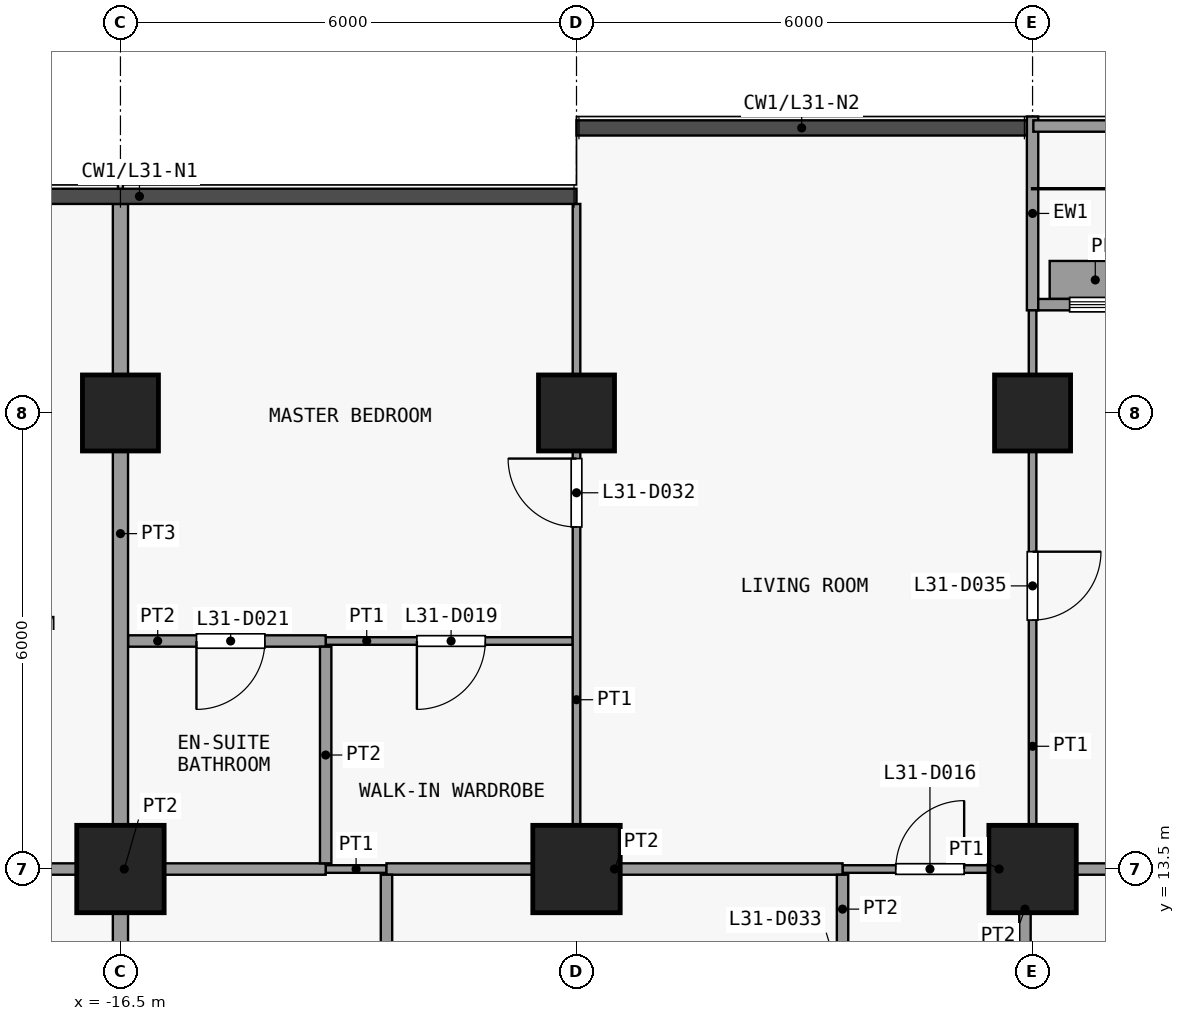
"""IFC4 building model, lengths in metres.
Left out: names, types, materials, properties, quantities, classifications, styles, units other than length and angle.
Written with IfcOpenShell. Run it as: python <this file> out.ifc"""

import sys

from ifc_helpers import new_model, si_unit, direction, frame, frame_2d, origin, origin_2d, place, context, subcontext, project, spatial, rectangle, extrude, element, fill, save


model = new_model("IFC4")
c1 = context("Model", 3, precision=1e-05, world=origin(), true_north=direction((0.0, 1.0)))
c2 = subcontext(c1, "Body", "Model", "MODEL_VIEW")
j1 = project(units=[si_unit("LENGTHUNIT", "METRE"), si_unit("PLANEANGLEUNIT", "RADIAN")], contexts=[c1])
p1 = place(None, origin())
s1 = spatial("IfcSite", under=j1, at=p1, CompositionType="ELEMENT")
p2 = place(p1, origin())
s2 = spatial("IfcBuilding", under=s1, at=p2, CompositionType="ELEMENT")
p3 = place(p2, frame((0.0, 0.0, 124.3)))
s3 = spatial("IfcBuildingStorey", under=s2, at=p3, CompositionType="ELEMENT", Elevation=124.3)
p4 = place(p3, frame((-16.5, 13.5, 0.0), z_axis=(0.0, 0.0, 1.0), x_axis=(1.0, 0.0, 0.0)))
e1 = element("IfcColumn", 1, at=p4, inside=s3, PredefinedType="COLUMN", context=c2, shape_type="SweptSolid", body=[
    extrude(rectangle(XDim=1.15, YDim=1.15, at=origin_2d()), origin(), (0.0, 0.0, 1.0), 3.6),
])
p5 = place(p3, frame((-16.5, 19.5, 0.0), z_axis=(0.0, 0.0, 1.0), x_axis=(1.0, 0.0, 0.0)))
e2 = element("IfcColumn", 2, at=p5, inside=s3, PredefinedType="COLUMN", context=c2, shape_type="SweptSolid", body=[
    extrude(rectangle(XDim=1.0, YDim=1.0, at=origin_2d()), origin(), (0.0, 0.0, 1.0), 3.6),
])
p6 = place(p3, frame((-10.5, 13.5, 0.0), z_axis=(0.0, 0.0, 1.0), x_axis=(1.0, 0.0, 0.0)))
e3 = element("IfcColumn", 3, at=p6, inside=s3, PredefinedType="COLUMN", context=c2, shape_type="SweptSolid", body=[
    extrude(rectangle(XDim=1.15, YDim=1.15, at=origin_2d()), origin(), (0.0, 0.0, 1.0), 3.6),
])
p7 = place(p3, frame((-10.5, 19.5, 0.0), z_axis=(0.0, 0.0, 1.0), x_axis=(1.0, 0.0, 0.0)))
e4 = element("IfcColumn", 4, at=p7, inside=s3, PredefinedType="COLUMN", context=c2, shape_type="SweptSolid", body=[
    extrude(rectangle(XDim=1.0, YDim=1.0, at=origin_2d()), origin(), (0.0, 0.0, 1.0), 3.6),
])
p8 = place(p3, frame((-4.5, 13.5, 0.0), z_axis=(0.0, 0.0, 1.0), x_axis=(1.0, 0.0, 0.0)))
e5 = element("IfcColumn", 5, at=p8, inside=s3, PredefinedType="COLUMN", context=c2, shape_type="SweptSolid", body=[
    extrude(rectangle(XDim=1.15, YDim=1.15, at=origin_2d()), origin(), (0.0, 0.0, 1.0), 3.6),
])
p9 = place(p3, frame((-4.5, 19.5, 0.0), z_axis=(0.0, 0.0, 1.0), x_axis=(1.0, 0.0, 0.0)))
e6 = element("IfcColumn", 6, at=p9, inside=s3, PredefinedType="COLUMN", context=c2, shape_type="SweptSolid", body=[
    extrude(rectangle(XDim=1.0, YDim=1.0, at=origin_2d()), origin(), (0.0, 0.0, 1.0), 3.6),
])
p10 = place(p3, frame((-4.5, 20.85, 0.0), z_axis=(0.0, 0.0, 1.0), x_axis=(0.0, 1.0, 0.0)))
e7 = element("IfcWall", 7, at=p10, inside=s3, PredefinedType="SOLIDWALL", context=c2, shape_type="SweptSolid", body=[
    extrude(rectangle(XDim=2.55, YDim=0.15, at=frame_2d((1.275, 0.0))), origin(), (0.0, 0.0, 1.0), 3.3),
])
p11 = place(p3, frame((-4.425, 20.925, 0.0), z_axis=(0.0, 0.0, 1.0), x_axis=(1.0, 0.0, 0.0)))
e8 = element("IfcWall", 8, at=p11, inside=s3, PredefinedType="SOLIDWALL", context=c2, shape_type="SweptSolid", body=[
    extrude(rectangle(XDim=8.925, YDim=0.15, at=frame_2d((4.462, 0.0))), origin(), (0.0, 0.0, 1.0), 3.3),
])
p12 = place(p11, frame((3.825, 0.0, 0.0)))
e9 = element("IfcOpeningElement", 9, at=p12, cuts=e8, PredefinedType="OPENING", context=c2, shape_type="SweptSolid", body=[
    extrude(rectangle(XDim=1.2, YDim=2.4, at=frame_2d((0.6, 1.2))), frame((0.0, 0.085, 0.0), z_axis=(0.0, -1.0, 0.0), x_axis=(1.0, 0.0, 0.0)), (0.0, 0.0, 1.0), 0.17),
])
p13 = place(p11, frame((0.413, 0.0, 0.9)))
e10 = element("IfcOpeningElement", 10, at=p13, cuts=e8, PredefinedType="OPENING", context=c2, shape_type="SweptSolid", body=[
    extrude(rectangle(XDim=3.0, YDim=2.1, at=frame_2d((1.5, 1.05))), frame((0.0, 0.085, 0.0), z_axis=(0.0, -1.0, 0.0), x_axis=(1.0, 0.0, 0.0)), (0.0, 0.0, 1.0), 0.17),
])
p14 = place(p11, frame((5.475, 0.0, 0.9)))
e11 = element("IfcOpeningElement", 11, at=p14, cuts=e8, PredefinedType="OPENING", context=c2, shape_type="SweptSolid", body=[
    extrude(rectangle(XDim=3.0, YDim=2.1, at=frame_2d((1.5, 1.05))), frame((0.0, 0.085, 0.0), z_axis=(0.0, -1.0, 0.0), x_axis=(1.0, 0.0, 0.0)), (0.0, 0.0, 1.0), 0.17),
])
p15 = place(p3, frame((-4.275, 21.25, 0.0), z_axis=(0.0, 0.0, 1.0), x_axis=(1.0, 0.0, 0.0)))
e12 = element("IfcWall", 12, at=p15, inside=s3, PredefinedType="USERDEFINED", context=c2, shape_type="SweptSolid", body=[
    extrude(rectangle(XDim=1.2, YDim=0.5, at=frame_2d((0.6, 0.0))), origin(), (0.0, 0.0, 1.0), 0.9),
])
p16 = place(p3, frame((-4.49, 23.275, 0.0), z_axis=(0.0, 0.0, 1.0), x_axis=(1.0, 0.0, 0.0)))
e13 = element("IfcWall", 13, at=p16, inside=s3, PredefinedType="PARAPET", context=c2, shape_type="SweptSolid", body=[
    extrude(rectangle(XDim=8.94, YDim=0.15, at=frame_2d((4.47, 0.0))), origin(), (0.0, 0.0, 1.0), 1.15),
])
p17 = place(p3, frame((-13.8, 13.5, 0.0), z_axis=(0.0, 0.0, 1.0), x_axis=(1.0, 0.0, 0.0)))
e14 = element("IfcWall", 14, at=p17, inside=s3, PredefinedType="PARTITIONING", context=c2, shape_type="SweptSolid", body=[
    extrude(rectangle(XDim=0.8, YDim=0.1, at=frame_2d((0.4, 0.0))), origin(), (0.0, 0.0, 1.0), 3.3),
])
p18 = place(p3, frame((-7.0, 13.5, 0.0), z_axis=(0.0, 0.0, 1.0), x_axis=(1.0, 0.0, 0.0)))
e15 = element("IfcWall", 15, at=p18, inside=s3, PredefinedType="PARTITIONING", context=c2, shape_type="SweptSolid", body=[
    extrude(rectangle(XDim=2.4, YDim=0.1, at=frame_2d((1.2, 0.0))), origin(), (0.0, 0.0, 1.0), 3.3),
])
p19 = place(p18, frame((0.7, 0.0, 0.0)))
e16 = element("IfcOpeningElement", 16, at=p19, cuts=e15, PredefinedType="OPENING", context=c2, shape_type="SweptSolid", body=[
    extrude(rectangle(XDim=0.9, YDim=2.1, at=frame_2d((0.45, 1.05))), frame((0.0, 0.06, 0.0), z_axis=(0.0, -1.0, 0.0), x_axis=(1.0, 0.0, 0.0)), (0.0, 0.0, 1.0), 0.12),
])
p20 = place(p3, frame((-19.1, 13.5, 0.0), z_axis=(0.0, 0.0, 1.0), x_axis=(1.0, 0.0, 0.0)))
e17 = element("IfcWall", 17, at=p20, inside=s3, PredefinedType="PARTITIONING", context=c2, shape_type="SweptSolid", body=[
    extrude(rectangle(XDim=5.3, YDim=0.15, at=frame_2d((2.65, 0.0))), origin(), (0.0, 0.0, 1.0), 3.3),
])
p21 = place(p3, frame((-13.0, 13.5, 0.0), z_axis=(0.0, 0.0, 1.0), x_axis=(1.0, 0.0, 0.0)))
e18 = element("IfcWall", 18, at=p21, inside=s3, PredefinedType="PARTITIONING", context=c2, shape_type="SweptSolid", body=[
    extrude(rectangle(XDim=6.0, YDim=0.15, at=frame_2d((3.0, 0.0))), origin(), (0.0, 0.0, 1.0), 3.3),
])
p22 = place(p3, frame((-4.5, 13.5, 0.0), z_axis=(0.0, 0.0, 1.0), x_axis=(1.0, 0.0, 0.0)))
e19 = element("IfcWall", 19, at=p22, inside=s3, PredefinedType="PARTITIONING", context=c2, shape_type="SweptSolid", body=[
    extrude(rectangle(XDim=7.4, YDim=0.15, at=frame_2d((3.7, 0.0))), origin(), (0.0, 0.0, 1.0), 3.3),
])
p23 = place(p3, frame((-13.8, 16.5, 0.0), z_axis=(0.0, 0.0, 1.0), x_axis=(1.0, 0.0, 0.0)))
e20 = element("IfcWall", 20, at=p23, inside=s3, PredefinedType="PARTITIONING", context=c2, shape_type="SweptSolid", body=[
    extrude(rectangle(XDim=3.25, YDim=0.1, at=frame_2d((1.625, 0.0))), origin(), (0.0, 0.0, 1.0), 3.3),
])
p24 = place(p23, frame((1.2, 0.0, 0.0)))
e21 = element("IfcOpeningElement", 21, at=p24, cuts=e20, PredefinedType="OPENING", context=c2, shape_type="SweptSolid", body=[
    extrude(rectangle(XDim=0.9, YDim=2.1, at=frame_2d((0.45, 1.05))), frame((0.0, 0.06, 0.0), z_axis=(0.0, -1.0, 0.0), x_axis=(1.0, 0.0, 0.0)), (0.0, 0.0, 1.0), 0.12),
])
p25 = place(p3, frame((-16.4, 16.5, 0.0), z_axis=(0.0, 0.0, 1.0), x_axis=(1.0, 0.0, 0.0)))
e22 = element("IfcWall", 22, at=p25, inside=s3, PredefinedType="PARTITIONING", context=c2, shape_type="SweptSolid", body=[
    extrude(rectangle(XDim=2.6, YDim=0.15, at=frame_2d((1.3, 0.0))), origin(), (0.0, 0.0, 1.0), 3.3),
])
p26 = place(p25, frame((0.9, 0.0, 0.0)))
e23 = element("IfcOpeningElement", 23, at=p26, cuts=e22, PredefinedType="OPENING", context=c2, shape_type="SweptSolid", body=[
    extrude(rectangle(XDim=0.9, YDim=2.1, at=frame_2d((0.45, 1.05))), frame((0.0, 0.085, 0.0), z_axis=(0.0, -1.0, 0.0), x_axis=(1.0, 0.0, 0.0)), (0.0, 0.0, 1.0), 0.17),
])
p27 = place(p3, frame((-16.5, 10.6, 0.0), z_axis=(0.0, 0.0, 1.0), x_axis=(0.0, 1.0, 0.0)))
e24 = element("IfcWall", 24, at=p27, inside=s3, PredefinedType="PARTITIONING", context=c2, shape_type="SweptSolid", body=[
    extrude(rectangle(XDim=2.825, YDim=0.2, at=frame_2d((1.413, 0.0))), origin(), (0.0, 0.0, 1.0), 3.3),
])
p28 = place(p3, frame((-16.5, 13.575, 0.0), z_axis=(0.0, 0.0, 1.0), x_axis=(0.0, 1.0, 0.0)))
e25 = element("IfcWall", 25, at=p28, inside=s3, PredefinedType="PARTITIONING", context=c2, shape_type="SweptSolid", body=[
    extrude(rectangle(XDim=8.675, YDim=0.2, at=frame_2d((4.337, 0.0))), origin(), (0.0, 0.0, 1.0), 3.3),
])
p29 = place(p3, frame((-13.8, 13.575, 0.0), z_axis=(0.0, 0.0, 1.0), x_axis=(0.0, 1.0, 0.0)))
e26 = element("IfcWall", 26, at=p29, inside=s3, PredefinedType="PARTITIONING", context=c2, shape_type="SweptSolid", body=[
    extrude(rectangle(XDim=2.85, YDim=0.15, at=frame_2d((1.425, 0.0))), origin(), (0.0, 0.0, 1.0), 3.3),
])
p30 = place(p3, frame((-13.0, 10.6, 0.0), z_axis=(0.0, 0.0, 1.0), x_axis=(0.0, 1.0, 0.0)))
e27 = element("IfcWall", 27, at=p30, inside=s3, PredefinedType="PARTITIONING", context=c2, shape_type="SweptSolid", body=[
    extrude(rectangle(XDim=2.825, YDim=0.15, at=frame_2d((1.413, 0.0))), origin(), (0.0, 0.0, 1.0), 3.3),
])
p31 = place(p30, frame((1.0, 0.0, 0.0)))
e28 = element("IfcOpeningElement", 28, at=p31, cuts=e27, PredefinedType="OPENING", context=c2, shape_type="SweptSolid", body=[
    extrude(rectangle(XDim=0.9, YDim=2.1, at=frame_2d((0.45, 1.05))), frame((0.0, 0.085, 0.0), z_axis=(0.0, -1.0, 0.0), x_axis=(1.0, 0.0, 0.0)), (0.0, 0.0, 1.0), 0.17),
])
p32 = place(p3, frame((-10.5, 13.575, 0.0), z_axis=(0.0, 0.0, 1.0), x_axis=(0.0, 1.0, 0.0)))
e29 = element("IfcWall", 29, at=p32, inside=s3, PredefinedType="PARTITIONING", context=c2, shape_type="SweptSolid", body=[
    extrude(rectangle(XDim=8.675, YDim=0.1, at=frame_2d((4.337, 0.0))), origin(), (0.0, 0.0, 1.0), 3.3),
])
p33 = place(p32, frame((4.425, 0.0, 0.0)))
e30 = element("IfcOpeningElement", 30, at=p33, cuts=e29, PredefinedType="OPENING", context=c2, shape_type="SweptSolid", body=[
    extrude(rectangle(XDim=0.9, YDim=2.1, at=frame_2d((0.45, 1.05))), frame((0.0, 0.06, 0.0), z_axis=(0.0, -1.0, 0.0), x_axis=(1.0, 0.0, 0.0)), (0.0, 0.0, 1.0), 0.12),
])
p34 = place(p3, frame((-7.0, 10.6, 0.0), z_axis=(0.0, 0.0, 1.0), x_axis=(0.0, 1.0, 0.0)))
e31 = element("IfcWall", 31, at=p34, inside=s3, PredefinedType="PARTITIONING", context=c2, shape_type="SweptSolid", body=[
    extrude(rectangle(XDim=2.825, YDim=0.15, at=frame_2d((1.413, 0.0))), origin(), (0.0, 0.0, 1.0), 3.3),
])
p35 = place(p34, frame((0.9, 0.0, 0.0)))
e32 = element("IfcOpeningElement", 32, at=p35, cuts=e31, PredefinedType="OPENING", context=c2, shape_type="SweptSolid", body=[
    extrude(rectangle(XDim=0.9, YDim=2.1, at=frame_2d((0.45, 1.05))), frame((0.0, 0.085, 0.0), z_axis=(0.0, -1.0, 0.0), x_axis=(1.0, 0.0, 0.0)), (0.0, 0.0, 1.0), 0.17),
])
p36 = place(p3, frame((-4.6, 10.6, 0.0), z_axis=(0.0, 0.0, 1.0), x_axis=(0.0, 1.0, 0.0)))
e33 = element("IfcWall", 33, at=p36, inside=s3, PredefinedType="PARTITIONING", context=c2, shape_type="SweptSolid", body=[
    extrude(rectangle(XDim=2.825, YDim=0.15, at=frame_2d((1.413, 0.0))), origin(), (0.0, 0.0, 1.0), 3.3),
])
p37 = place(p36, frame((0.9, 0.0, 0.0)))
e34 = element("IfcOpeningElement", 34, at=p37, cuts=e33, PredefinedType="OPENING", context=c2, shape_type="SweptSolid", body=[
    extrude(rectangle(XDim=0.9, YDim=2.1, at=frame_2d((0.45, 1.05))), frame((0.0, 0.085, 0.0), z_axis=(0.0, -1.0, 0.0), x_axis=(1.0, 0.0, 0.0)), (0.0, 0.0, 1.0), 0.17),
])
p38 = place(p3, frame((-4.5, 13.575, 0.0), z_axis=(0.0, 0.0, 1.0), x_axis=(0.0, 1.0, 0.0)))
e35 = element("IfcWall", 35, at=p38, inside=s3, PredefinedType="PARTITIONING", context=c2, shape_type="SweptSolid", body=[
    extrude(rectangle(XDim=7.275, YDim=0.1, at=frame_2d((3.638, 0.0))), origin(), (0.0, 0.0, 1.0), 3.3),
])
p39 = place(p38, frame((3.2, 0.0, 0.0)))
e36 = element("IfcOpeningElement", 36, at=p39, cuts=e35, PredefinedType="OPENING", context=c2, shape_type="SweptSolid", body=[
    extrude(rectangle(XDim=0.9, YDim=2.1, at=frame_2d((0.45, 1.05))), frame((0.0, 0.06, 0.0), z_axis=(0.0, -1.0, 0.0), x_axis=(1.0, 0.0, 0.0)), (0.0, 0.0, 1.0), 0.12),
])
p40 = place(p13, origin())
e37 = element("IfcWindow", 37, at=p40, inside=s3, PartitioningType="SINGLE_PANEL", PredefinedType="WINDOW", context=c2, shape_type="SweptSolid", body=[
    extrude(rectangle(XDim=3.0, YDim=2.1, at=frame_2d((1.5, 1.05))), frame((0.0, 0.03, 0.0), z_axis=(0.0, -1.0, 0.0), x_axis=(1.0, 0.0, 0.0)), (0.0, 0.0, 1.0), 0.06),
])
fill(e10, e37)
p41 = place(p19, origin())
e38 = element("IfcDoor", 38, at=p41, inside=s3, OperationType="SINGLE_SWING_LEFT", PredefinedType="DOOR", context=c2, shape_type="SweptSolid", body=[
    extrude(rectangle(XDim=0.9, YDim=2.1, at=frame_2d((0.45, 1.05))), frame((0.0, 0.025, 0.0), z_axis=(0.0, -1.0, 0.0), x_axis=(1.0, 0.0, 0.0)), (0.0, 0.0, 1.0), 0.05),
])
fill(e16, e38)
p42 = place(p24, origin())
e39 = element("IfcDoor", 39, at=p42, inside=s3, OperationType="SINGLE_SWING_LEFT", PredefinedType="DOOR", context=c2, shape_type="SweptSolid", body=[
    extrude(rectangle(XDim=0.9, YDim=2.1, at=frame_2d((0.45, 1.05))), frame((0.0, 0.025, 0.0), z_axis=(0.0, -1.0, 0.0), x_axis=(1.0, 0.0, 0.0)), (0.0, 0.0, 1.0), 0.05),
])
fill(e21, e39)
p43 = place(p26, origin())
e40 = element("IfcDoor", 40, at=p43, inside=s3, OperationType="SINGLE_SWING_LEFT", PredefinedType="DOOR", context=c2, shape_type="SweptSolid", body=[
    extrude(rectangle(XDim=0.9, YDim=2.1, at=frame_2d((0.45, 1.05))), frame((0.0, 0.025, 0.0), z_axis=(0.0, -1.0, 0.0), x_axis=(1.0, 0.0, 0.0)), (0.0, 0.0, 1.0), 0.05),
])
fill(e23, e40)
p44 = place(p33, origin())
e41 = element("IfcDoor", 41, at=p44, inside=s3, OperationType="SINGLE_SWING_LEFT", PredefinedType="DOOR", context=c2, shape_type="SweptSolid", body=[
    extrude(rectangle(XDim=0.9, YDim=2.1, at=frame_2d((0.45, 1.05))), frame((0.0, 0.025, 0.0), z_axis=(0.0, -1.0, 0.0), x_axis=(1.0, 0.0, 0.0)), (0.0, 0.0, 1.0), 0.05),
])
fill(e30, e41)
p45 = place(p39, origin())
e42 = element("IfcDoor", 42, at=p45, inside=s3, OperationType="SINGLE_SWING_RIGHT", PredefinedType="DOOR", context=c2, shape_type="SweptSolid", body=[
    extrude(rectangle(XDim=0.9, YDim=2.1, at=frame_2d((0.45, 1.05))), frame((0.0, 0.025, 0.0), z_axis=(0.0, -1.0, 0.0), x_axis=(1.0, 0.0, 0.0)), (0.0, 0.0, 1.0), 0.05),
])
fill(e36, e42)
save(model, sys.argv[1])
